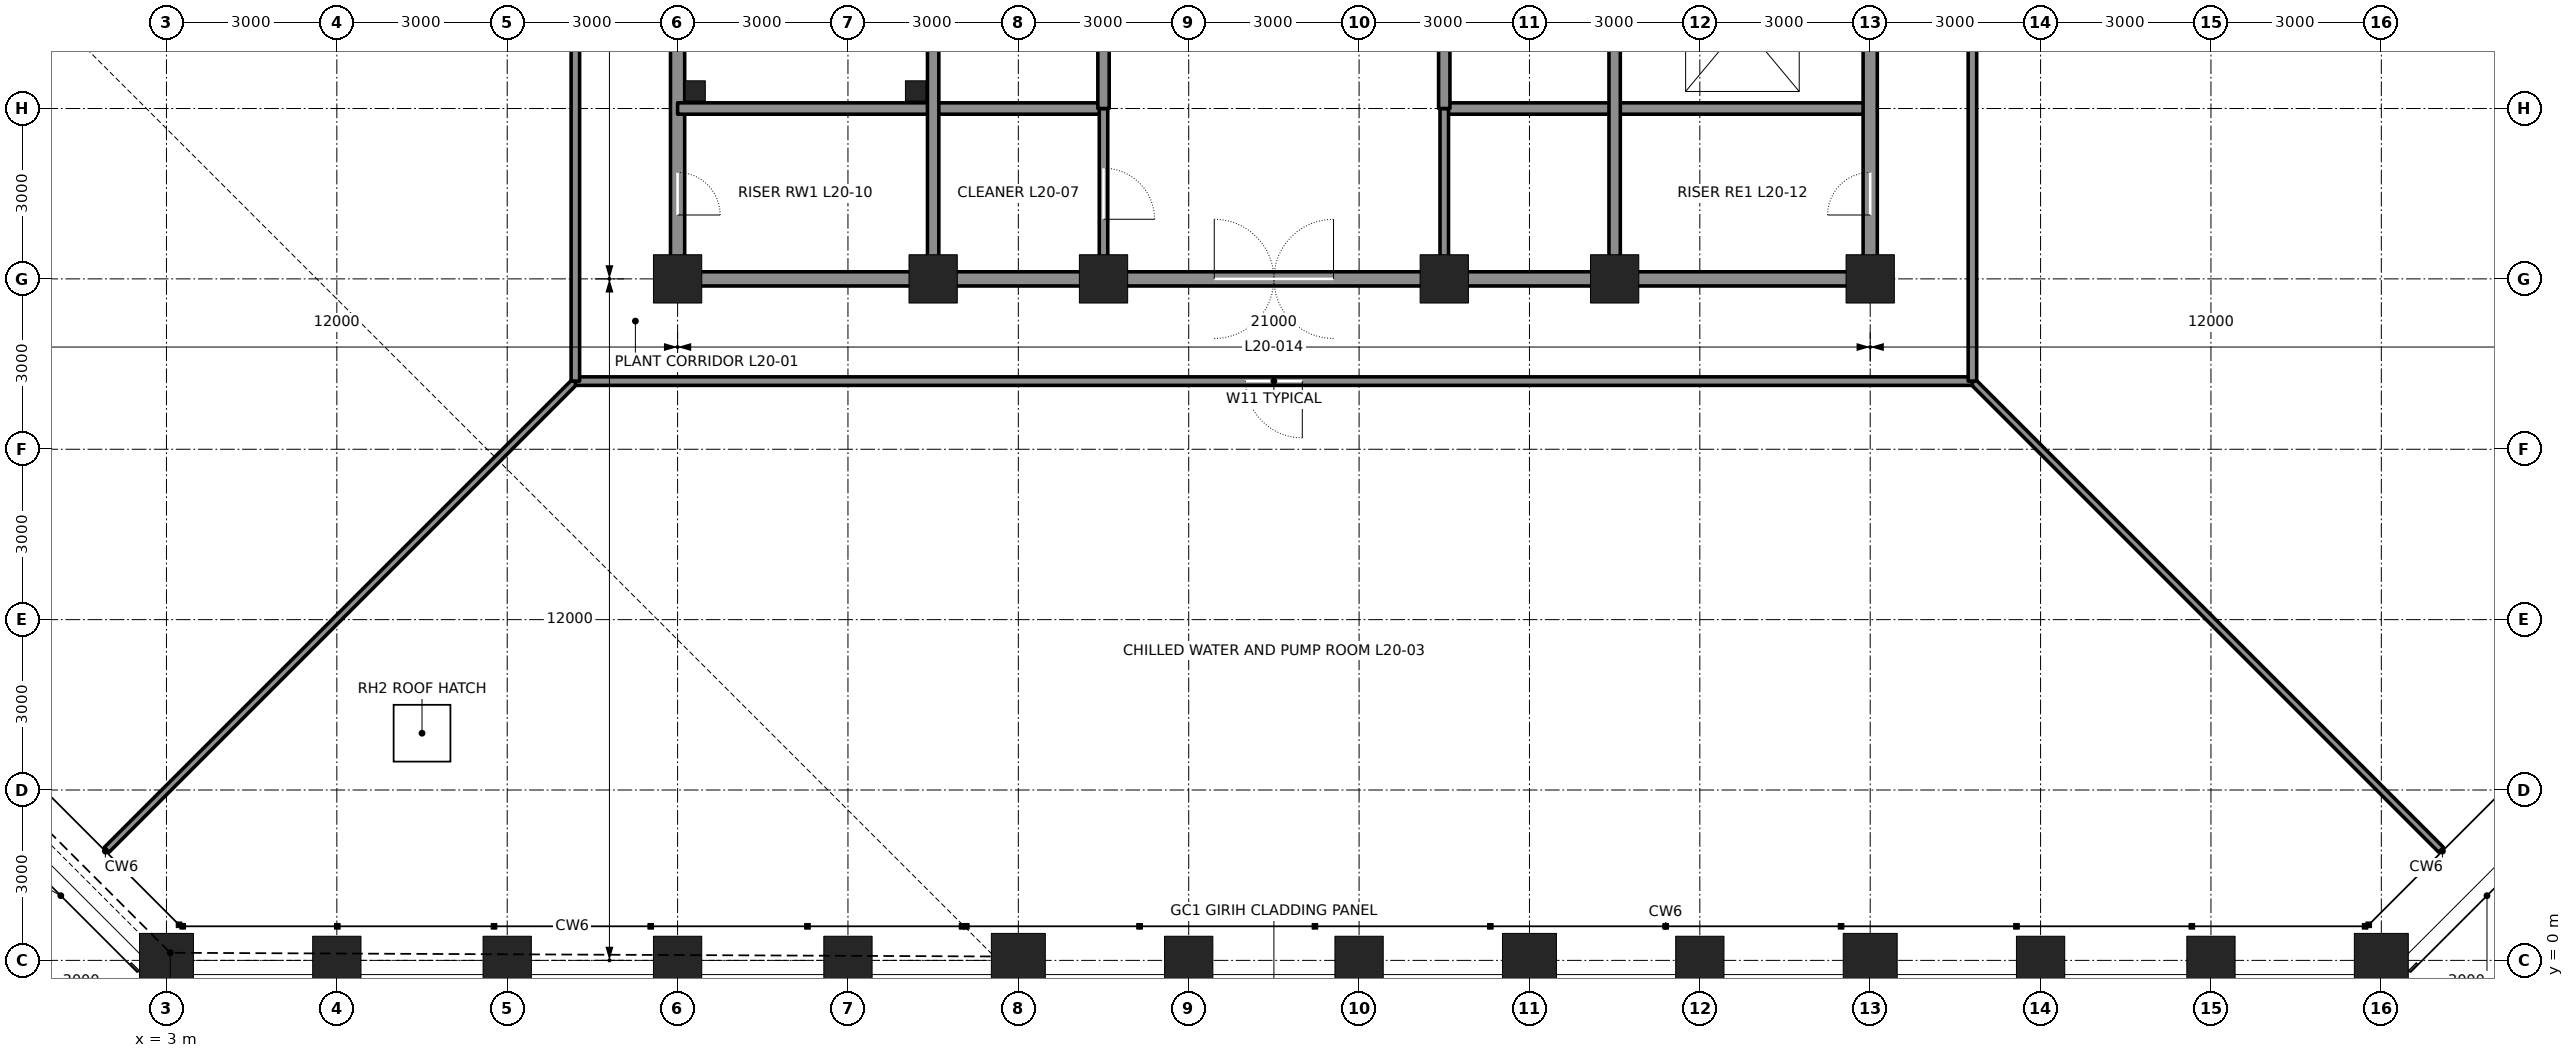
"""IFC4 building model, lengths in metres.
Left out: names, types, materials, properties, quantities, classifications, styles, units other than length and angle.
Written with IfcOpenShell. Run it as: python <this file> out.ifc"""

import sys

from ifc_helpers import new_model, si_unit, direction, frame, frame_2d, origin, origin_2d, place, context, subcontext, project, spatial, rectangle, hollow_rectangle, extrude, element, fill, save


model = new_model("IFC4")
c1 = context("Model", 3, precision=1e-05, world=origin(), true_north=direction((0.0, 1.0)))
c2 = subcontext(c1, "Body", "Model", "MODEL_VIEW")
j1 = project(units=[si_unit("LENGTHUNIT", "METRE"), si_unit("PLANEANGLEUNIT", "RADIAN")], contexts=[c1])
p1 = place(None, origin())
s1 = spatial("IfcSite", under=j1, at=p1, CompositionType="ELEMENT")
p2 = place(p1, origin())
s2 = spatial("IfcBuilding", under=s1, at=p2, CompositionType="ELEMENT")
p3 = place(p2, frame((0.0, 0.0, 96.3)))
s3 = spatial("IfcBuildingStorey", under=s2, at=p3, CompositionType="ELEMENT", Elevation=96.3)
p4 = place(p3, frame((3.0, 0.0, 0.0), z_axis=(0.0, 0.0, 1.0), x_axis=(0.0, -1.0, 0.0)))
e1 = element("IfcColumn", 1, at=p4, inside=s3, PredefinedType="COLUMN", context=c2, shape_type="SweptSolid", body=[
    extrude(hollow_rectangle(XDim=0.95, YDim=0.95, WallThickness=0.095, at=origin_2d()), origin(), (0.0, 0.0, 1.0), 2.345),
])
p5 = place(p3, frame((6.0, 0.0, 0.0), z_axis=(0.0, 0.0, 1.0), x_axis=(0.0, -1.0, 0.0)))
e2 = element("IfcColumn", 2, at=p5, inside=s3, PredefinedType="COLUMN", context=c2, shape_type="SweptSolid", body=[
    extrude(hollow_rectangle(XDim=0.85, YDim=0.85, WallThickness=0.085, at=origin_2d()), origin(), (0.0, 0.0, 1.0), 2.796),
])
p6 = place(p3, frame((9.0, 0.0, 0.0), z_axis=(0.0, 0.0, 1.0), x_axis=(0.0, -1.0, 0.0)))
e3 = element("IfcColumn", 3, at=p6, inside=s3, PredefinedType="COLUMN", context=c2, shape_type="SweptSolid", body=[
    extrude(hollow_rectangle(XDim=0.85, YDim=0.85, WallThickness=0.085, at=origin_2d()), origin(), (0.0, 0.0, 1.0), 3.247),
])
p7 = place(p3, frame((12.0, 0.0, 0.0), z_axis=(0.0, 0.0, 1.0), x_axis=(0.0, -1.0, 0.0)))
e4 = element("IfcColumn", 4, at=p7, inside=s3, PredefinedType="COLUMN", context=c2, shape_type="SweptSolid", body=[
    extrude(hollow_rectangle(XDim=0.85, YDim=0.85, WallThickness=0.085, at=origin_2d()), origin(), (0.0, 0.0, 1.0), 3.698),
])
p8 = place(p3, frame((15.0, 0.0, 0.0), z_axis=(0.0, 0.0, 1.0), x_axis=(0.0, -1.0, 0.0)))
e5 = element("IfcColumn", 5, at=p8, inside=s3, PredefinedType="COLUMN", context=c2, shape_type="SweptSolid", body=[
    extrude(hollow_rectangle(XDim=0.85, YDim=0.85, WallThickness=0.085, at=origin_2d()), origin(), (0.0, 0.0, 1.0), 4.149),
])
p9 = place(p3, frame((18.0, 0.0, 0.0), z_axis=(0.0, 0.0, 1.0), x_axis=(0.0, -1.0, 0.0)))
e6 = element("IfcColumn", 6, at=p9, inside=s3, PredefinedType="COLUMN", context=c2, shape_type="SweptSolid", body=[
    extrude(hollow_rectangle(XDim=0.95, YDim=0.95, WallThickness=0.11, at=origin_2d()), origin(), (0.0, 0.0, 1.0), 6.0),
])
for number, where, z_axis, x_axis in (
    (7, (21.0, 0.0, 0.0), (0.0, 0.0, 1.0), (0.0, -1.0, 0.0)),
    (8, (24.0, 0.0, 0.0), (0.0, 0.0, 1.0), (0.0, -1.0, 0.0)),
):
    element("IfcColumn", number, at=place(p3, frame(where, z_axis=z_axis, x_axis=x_axis)), inside=s3, PredefinedType="COLUMN", context=c2, shape_type="SweptSolid", body=[
        extrude(hollow_rectangle(XDim=0.85, YDim=0.85, WallThickness=0.085, at=origin_2d()), origin(), (0.0, 0.0, 1.0), 6.0),
    ])
p10 = place(p3, frame((27.0, 0.0, 0.0), z_axis=(0.0, 0.0, 1.0), x_axis=(0.0, -1.0, 0.0)))
e9 = element("IfcColumn", 9, at=p10, inside=s3, PredefinedType="COLUMN", context=c2, shape_type="SweptSolid", body=[
    extrude(hollow_rectangle(XDim=0.95, YDim=0.95, WallThickness=0.11, at=origin_2d()), origin(), (0.0, 0.0, 1.0), 6.0),
])
p11 = place(p3, frame((30.0, 0.0, 0.0), z_axis=(0.0, 0.0, 1.0), x_axis=(0.0, -1.0, 0.0)))
e10 = element("IfcColumn", 10, at=p11, inside=s3, PredefinedType="COLUMN", context=c2, shape_type="SweptSolid", body=[
    extrude(hollow_rectangle(XDim=0.85, YDim=0.85, WallThickness=0.085, at=origin_2d()), origin(), (0.0, 0.0, 1.0), 6.0),
])
p12 = place(p3, frame((33.0, 0.0, 0.0), z_axis=(0.0, 0.0, 1.0), x_axis=(0.0, -1.0, 0.0)))
e11 = element("IfcColumn", 11, at=p12, inside=s3, PredefinedType="COLUMN", context=c2, shape_type="SweptSolid", body=[
    extrude(hollow_rectangle(XDim=0.95, YDim=0.95, WallThickness=0.11, at=origin_2d()), origin(), (0.0, 0.0, 1.0), 6.0),
])
for number, where, z_axis, x_axis in (
    (12, (36.0, 0.0, 0.0), (0.0, 0.0, 1.0), (0.0, -1.0, 0.0)),
    (13, (39.0, 0.0, 0.0), (0.0, 0.0, 1.0), (0.0, -1.0, 0.0)),
):
    element("IfcColumn", number, at=place(p3, frame(where, z_axis=z_axis, x_axis=x_axis)), inside=s3, PredefinedType="COLUMN", context=c2, shape_type="SweptSolid", body=[
        extrude(hollow_rectangle(XDim=0.85, YDim=0.85, WallThickness=0.085, at=origin_2d()), origin(), (0.0, 0.0, 1.0), 6.0),
    ])
p13 = place(p3, frame((42.0, 0.0, 0.0), z_axis=(0.0, 0.0, 1.0), x_axis=(0.0, -1.0, 0.0)))
e14 = element("IfcColumn", 14, at=p13, inside=s3, PredefinedType="COLUMN", context=c2, shape_type="SweptSolid", body=[
    extrude(hollow_rectangle(XDim=0.95, YDim=0.95, WallThickness=0.095, at=origin_2d()), origin(), (0.0, 0.0, 1.0), 6.0),
])
for number, where, z_axis, x_axis in (
    (15, (12.0, 12.0, 0.0), (0.0, 0.0, 1.0), (1.0, 0.0, 0.0)),
    (16, (16.5, 12.0, 0.0), (0.0, 0.0, 1.0), (1.0, 0.0, 0.0)),
    (17, (19.5, 12.0, 0.0), (0.0, 0.0, 1.0), (1.0, 0.0, 0.0)),
    (18, (25.5, 12.0, 0.0), (0.0, 0.0, 1.0), (1.0, 0.0, 0.0)),
    (19, (28.5, 12.0, 0.0), (0.0, 0.0, 1.0), (1.0, 0.0, 0.0)),
    (20, (33.0, 12.0, 0.0), (0.0, 0.0, 1.0), (1.0, 0.0, 0.0)),
):
    element("IfcColumn", number, at=place(p3, frame(where, z_axis=z_axis, x_axis=x_axis)), inside=s3, PredefinedType="COLUMN", context=c2, shape_type="SweptSolid", body=[
        extrude(hollow_rectangle(XDim=0.85, YDim=0.85, WallThickness=0.085, at=origin_2d()), origin(), (0.0, 0.0, 1.0), 6.0),
    ])
p14 = place(p3, frame((12.0, 12.25, 0.0), z_axis=(0.0, 0.0, 1.0), x_axis=(0.0, 1.0, 0.0)))
e21 = element("IfcWall", 21, at=p14, inside=s3, PredefinedType="SOLIDWALL", context=c2, shape_type="SweptSolid", body=[
    extrude(rectangle(XDim=8.5, YDim=0.25, at=frame_2d((4.25, 0.0))), origin(), (0.0, 0.0, 1.0), 4.913),
])
p15 = place(p14, frame((0.875, 0.0, 0.0)))
e22 = element("IfcOpeningElement", 22, at=p15, cuts=e21, PredefinedType="OPENING", context=c2, shape_type="SweptSolid", body=[
    extrude(rectangle(XDim=0.75, YDim=2.1, at=frame_2d((0.375, 1.05))), frame((0.0, 0.135, 0.0), z_axis=(0.0, -1.0, 0.0), x_axis=(1.0, 0.0, 0.0)), (0.0, 0.0, 1.0), 0.27),
])
p16 = place(p3, frame((12.25, 12.0, 0.0), z_axis=(0.0, 0.0, 1.0), x_axis=(1.0, 0.0, 0.0)))
e23 = element("IfcWall", 23, at=p16, inside=s3, PredefinedType="SOLIDWALL", context=c2, shape_type="SweptSolid", body=[
    extrude(rectangle(XDim=4.0, YDim=0.25, at=frame_2d((2.0, 0.0))), origin(), (0.0, 0.0, 1.0), 4.981),
])
for number, where, z_axis, x_axis in (
    (24, (16.75, 12.0, 0.0), (0.0, 0.0, 1.0), (1.0, 0.0, 0.0)),
    (25, (25.75, 12.0, 0.0), (0.0, 0.0, 1.0), (1.0, 0.0, 0.0)),
):
    element("IfcWall", number, at=place(p3, frame(where, z_axis=z_axis, x_axis=x_axis)), inside=s3, PredefinedType="SOLIDWALL", context=c2, shape_type="SweptSolid", body=[
        extrude(rectangle(XDim=2.5, YDim=0.25, at=frame_2d((1.25, 0.0))), origin(), (0.0, 0.0, 1.0), 4.981),
    ])
p17 = place(p3, frame((28.75, 12.0, 0.0), z_axis=(0.0, 0.0, 1.0), x_axis=(1.0, 0.0, 0.0)))
e26 = element("IfcWall", 26, at=p17, inside=s3, PredefinedType="SOLIDWALL", context=c2, shape_type="SweptSolid", body=[
    extrude(rectangle(XDim=4.0, YDim=0.25, at=frame_2d((2.0, 0.0))), origin(), (0.0, 0.0, 1.0), 4.981),
])
for number, where, z_axis, x_axis in (
    (27, (12.0, 15.0, 0.0), (0.0, 0.0, 1.0), (1.0, 0.0, 0.0)),
    (28, (25.5, 15.0, 0.0), (0.0, 0.0, 1.0), (1.0, 0.0, 0.0)),
):
    element("IfcWall", number, at=place(p3, frame(where, z_axis=z_axis, x_axis=x_axis)), inside=s3, PredefinedType="SOLIDWALL", context=c2, shape_type="SweptSolid", body=[
        extrude(rectangle(XDim=7.5, YDim=0.2, at=frame_2d((3.75, 0.0))), origin(), (0.0, 0.0, 1.0), 5.84),
    ])
p18 = place(p3, frame((16.5, 12.25, 0.0), z_axis=(0.0, 0.0, 1.0), x_axis=(0.0, 1.0, 0.0)))
e29 = element("IfcWall", 29, at=p18, inside=s3, PredefinedType="SOLIDWALL", context=c2, shape_type="SweptSolid", body=[
    extrude(rectangle(XDim=8.5, YDim=0.2, at=frame_2d((4.25, 0.0))), origin(), (0.0, 0.0, 1.0), 4.913),
])
p19 = place(p3, frame((19.5, 12.25, 0.0), z_axis=(0.0, 0.0, 1.0), x_axis=(0.0, 1.0, 0.0)))
e30 = element("IfcWall", 30, at=p19, inside=s3, PredefinedType="PARTITIONING", context=c2, shape_type="SweptSolid", body=[
    extrude(rectangle(XDim=2.75, YDim=0.15, at=frame_2d((1.375, 0.0))), origin(), (0.0, 0.0, 1.0), 4.865),
])
p20 = place(p19, frame((0.8, 0.0, 0.0)))
e31 = element("IfcOpeningElement", 31, at=p20, cuts=e30, PredefinedType="OPENING", context=c2, shape_type="SweptSolid", body=[
    extrude(rectangle(XDim=0.9, YDim=2.1, at=frame_2d((0.45, 1.05))), frame((0.0, 0.085, 0.0), z_axis=(0.0, -1.0, 0.0), x_axis=(1.0, 0.0, 0.0)), (0.0, 0.0, 1.0), 0.17),
])
p21 = place(p3, frame((19.5, 15.0, 0.0), z_axis=(0.0, 0.0, 1.0), x_axis=(0.0, 1.0, 0.0)))
e32 = element("IfcWall", 32, at=p21, inside=s3, PredefinedType="SOLIDWALL", context=c2, shape_type="SweptSolid", body=[
    extrude(rectangle(XDim=12.0, YDim=0.2, at=frame_2d((6.0, 0.0))), origin(), (0.0, 0.0, 1.0), 4.865),
])
p22 = place(p3, frame((25.5, 12.25, 0.0), z_axis=(0.0, 0.0, 1.0), x_axis=(0.0, 1.0, 0.0)))
e33 = element("IfcWall", 33, at=p22, inside=s3, PredefinedType="PARTITIONING", context=c2, shape_type="SweptSolid", body=[
    extrude(rectangle(XDim=2.75, YDim=0.15, at=frame_2d((1.375, 0.0))), origin(), (0.0, 0.0, 1.0), 4.865),
])
p23 = place(p3, frame((25.5, 15.0, 0.0), z_axis=(0.0, 0.0, 1.0), x_axis=(0.0, 1.0, 0.0)))
e34 = element("IfcWall", 34, at=p23, inside=s3, PredefinedType="SOLIDWALL", context=c2, shape_type="SweptSolid", body=[
    extrude(rectangle(XDim=12.0, YDim=0.2, at=frame_2d((6.0, 0.0))), origin(), (0.0, 0.0, 1.0), 4.865),
])
p24 = place(p3, frame((28.5, 12.25, 0.0), z_axis=(0.0, 0.0, 1.0), x_axis=(0.0, 1.0, 0.0)))
e35 = element("IfcWall", 35, at=p24, inside=s3, PredefinedType="SOLIDWALL", context=c2, shape_type="SweptSolid", body=[
    extrude(rectangle(XDim=8.5, YDim=0.2, at=frame_2d((4.25, 0.0))), origin(), (0.0, 0.0, 1.0), 4.913),
])
p25 = place(p3, frame((33.0, 12.25, 0.0), z_axis=(0.0, 0.0, 1.0), x_axis=(0.0, 1.0, 0.0)))
e36 = element("IfcWall", 36, at=p25, inside=s3, PredefinedType="SOLIDWALL", context=c2, shape_type="SweptSolid", body=[
    extrude(rectangle(XDim=8.5, YDim=0.25, at=frame_2d((4.25, 0.0))), origin(), (0.0, 0.0, 1.0), 4.913),
])
p26 = place(p25, frame((6.65, 0.0, 0.0)))
e37 = element("IfcOpeningElement", 37, at=p26, cuts=e36, PredefinedType="OPENING", context=c2, shape_type="SweptSolid", body=[
    extrude(rectangle(XDim=1.2, YDim=2.1, at=frame_2d((0.6, 1.05))), frame((0.0, 0.135, 0.0), z_axis=(0.0, -1.0, 0.0), x_axis=(1.0, 0.0, 0.0)), (0.0, 0.0, 1.0), 0.27),
])
p27 = place(p25, frame((0.875, 0.0, 0.0)))
e38 = element("IfcOpeningElement", 38, at=p27, cuts=e36, PredefinedType="OPENING", context=c2, shape_type="SweptSolid", body=[
    extrude(rectangle(XDim=0.75, YDim=2.1, at=frame_2d((0.375, 1.05))), frame((0.0, 0.135, 0.0), z_axis=(0.0, -1.0, 0.0), x_axis=(1.0, 0.0, 0.0)), (0.0, 0.0, 1.0), 0.27),
])
p28 = place(p3, frame((19.5, 12.0, 0.0), z_axis=(0.0, 0.0, 1.0), x_axis=(1.0, 0.0, 0.0)))
e39 = element("IfcWall", 39, at=p28, inside=s3, PredefinedType="SOLIDWALL", context=c2, shape_type="SweptSolid", body=[
    extrude(rectangle(XDim=6.0, YDim=0.25, at=frame_2d((3.0, 0.0))), origin(), (0.0, 0.0, 1.0), 4.981),
])
p29 = place(p28, frame((1.95, 0.0, 0.0)))
e40 = element("IfcOpeningElement", 40, at=p29, cuts=e39, PredefinedType="OPENING", context=c2, shape_type="SweptSolid", body=[
    extrude(rectangle(XDim=2.1, YDim=2.4, at=frame_2d((1.05, 1.2))), frame((0.0, 0.135, 0.0), z_axis=(0.0, -1.0, 0.0), x_axis=(1.0, 0.0, 0.0)), (0.0, 0.0, 1.0), 0.27),
])
for number, where, z_axis, x_axis in (
    (41, (10.2, 10.2, 0.0), (0.0, 0.0, 1.0), (-0.707, -0.707, 0.0)),
    (42, (34.8, 10.2, 0.0), (0.0, 0.0, 1.0), (0.707, -0.707, 0.0)),
):
    element("IfcWall", number, at=place(p3, frame(where, z_axis=z_axis, x_axis=x_axis)), inside=s3, PredefinedType="PARTITIONING", context=c2, shape_type="SweptSolid", body=[
        extrude(rectangle(XDim=11.671, YDim=0.12, at=frame_2d((5.836, 0.0))), origin(), (0.0, 0.0, 1.0), 5.84),
    ])
p30 = place(p3, frame((10.2, 10.2, 0.0), z_axis=(0.0, 0.0, 1.0), x_axis=(1.0, 0.0, 0.0)))
e43 = element("IfcWall", 43, at=p30, inside=s3, PredefinedType="PARTITIONING", context=c2, shape_type="SweptSolid", body=[
    extrude(rectangle(XDim=24.6, YDim=0.15, at=frame_2d((12.3, 0.0))), origin(), (0.0, 0.0, 1.0), 5.84),
])
p31 = place(p30, frame((11.8, 0.0, 0.0)))
e44 = element("IfcOpeningElement", 44, at=p31, cuts=e43, PredefinedType="OPENING", context=c2, shape_type="SweptSolid", body=[
    extrude(rectangle(XDim=1.0, YDim=2.4, at=frame_2d((0.5, 1.2))), frame((0.0, 0.085, 0.0), z_axis=(0.0, -1.0, 0.0), x_axis=(1.0, 0.0, 0.0)), (0.0, 0.0, 1.0), 0.17),
])
p32 = place(p3, frame((10.2, 10.2, 0.0), z_axis=(0.0, 0.0, 1.0), x_axis=(0.0, 1.0, 0.0)))
e45 = element("IfcWall", 45, at=p32, inside=s3, PredefinedType="PARTITIONING", context=c2, shape_type="SweptSolid", body=[
    extrude(rectangle(XDim=24.6, YDim=0.15, at=frame_2d((12.3, 0.0))), origin(), (0.0, 0.0, 1.0), 5.84),
])
p33 = place(p32, frame((11.8, 0.0, 0.0)))
e46 = element("IfcOpeningElement", 46, at=p33, cuts=e45, PredefinedType="OPENING", context=c2, shape_type="SweptSolid", body=[
    extrude(rectangle(XDim=1.0, YDim=2.4, at=frame_2d((0.5, 1.2))), frame((0.0, 0.085, 0.0), z_axis=(0.0, -1.0, 0.0), x_axis=(1.0, 0.0, 0.0)), (0.0, 0.0, 1.0), 0.17),
])
p34 = place(p3, frame((34.8, 10.2, 0.0), z_axis=(0.0, 0.0, 1.0), x_axis=(0.0, 1.0, 0.0)))
e47 = element("IfcWall", 47, at=p34, inside=s3, PredefinedType="PARTITIONING", context=c2, shape_type="SweptSolid", body=[
    extrude(rectangle(XDim=24.6, YDim=0.15, at=frame_2d((12.3, 0.0))), origin(), (0.0, 0.0, 1.0), 5.84),
])
p35 = place(p34, frame((11.8, 0.0, 0.0)))
e48 = element("IfcOpeningElement", 48, at=p35, cuts=e47, PredefinedType="OPENING", context=c2, shape_type="SweptSolid", body=[
    extrude(rectangle(XDim=1.0, YDim=2.4, at=frame_2d((0.5, 1.2))), frame((0.0, 0.085, 0.0), z_axis=(0.0, -1.0, 0.0), x_axis=(1.0, 0.0, 0.0)), (0.0, 0.0, 1.0), 0.17),
])
for number, where, z_axis, x_axis in (
    (49, (12.31, 15.31, 0.0), (0.0, 0.0, 1.0), (1.0, 0.0, 0.0)),
    (50, (16.19, 15.31, 0.0), (0.0, 0.0, 1.0), (1.0, 0.0, 0.0)),
):
    element("IfcColumn", number, at=place(p3, frame(where, z_axis=z_axis, x_axis=x_axis)), inside=s3, PredefinedType="COLUMN", context=c2, shape_type="SweptSolid", body=[
        extrude(hollow_rectangle(XDim=0.356, YDim=0.356, WallThickness=0.015, at=origin_2d()), origin(), (0.0, 0.0, 1.0), 6.0),
    ])
p36 = place(p3, frame((7.5, 4.0, 4.519)))
p37 = place(p36, frame((0.0, 0.0, 0.454)))
e51 = element("IfcDoor", 51, at=p37, inside=s3, OperationType="SINGLE_SWING_LEFT", PredefinedType="TRAPDOOR", context=c2, shape_type="SweptSolid", body=[
    extrude(rectangle(XDim=1.0, YDim=1.0, at=origin_2d()), origin(), (0.0, 0.0, 1.0), 0.05),
])
p38 = place(p29, origin())
e52 = element("IfcDoor", 52, at=p38, inside=s3, OperationType="DOUBLE_DOOR_DOUBLE_SWING", PredefinedType="DOOR", context=c2, shape_type="SweptSolid", body=[
    extrude(rectangle(XDim=2.1, YDim=2.4, at=frame_2d((1.05, 1.2))), frame((0.0, 0.025, 0.0), z_axis=(0.0, -1.0, 0.0), x_axis=(1.0, 0.0, 0.0)), (0.0, 0.0, 1.0), 0.05),
])
fill(e40, e52)
p39 = place(p15, frame((0.75, 0.0, 0.0), z_axis=(0.0, 0.0, 1.0), x_axis=(-1.0, 0.0, 0.0)))
e53 = element("IfcDoor", 53, at=p39, inside=s3, OperationType="SINGLE_SWING_RIGHT", PredefinedType="DOOR", context=c2, shape_type="SweptSolid", body=[
    extrude(rectangle(XDim=0.75, YDim=2.1, at=frame_2d((0.375, 1.05))), frame((0.0, 0.025, 0.0), z_axis=(0.0, -1.0, 0.0), x_axis=(1.0, 0.0, 0.0)), (0.0, 0.0, 1.0), 0.05),
])
fill(e22, e53)
p40 = place(p27, origin())
e54 = element("IfcDoor", 54, at=p40, inside=s3, OperationType="SINGLE_SWING_LEFT", PredefinedType="DOOR", context=c2, shape_type="SweptSolid", body=[
    extrude(rectangle(XDim=0.75, YDim=2.1, at=frame_2d((0.375, 1.05))), frame((0.0, 0.025, 0.0), z_axis=(0.0, -1.0, 0.0), x_axis=(1.0, 0.0, 0.0)), (0.0, 0.0, 1.0), 0.05),
])
fill(e38, e54)
p41 = place(p20, frame((0.9, 0.0, 0.0), z_axis=(0.0, 0.0, 1.0), x_axis=(-1.0, 0.0, 0.0)))
e55 = element("IfcDoor", 55, at=p41, inside=s3, OperationType="SINGLE_SWING_RIGHT", PredefinedType="DOOR", context=c2, shape_type="SweptSolid", body=[
    extrude(rectangle(XDim=0.9, YDim=2.1, at=frame_2d((0.45, 1.05))), frame((0.0, 0.025, 0.0), z_axis=(0.0, -1.0, 0.0), x_axis=(1.0, 0.0, 0.0)), (0.0, 0.0, 1.0), 0.05),
])
fill(e31, e55)
p42 = place(p31, frame((1.0, 0.0, 0.0), z_axis=(0.0, 0.0, 1.0), x_axis=(-1.0, 0.0, 0.0)))
e56 = element("IfcDoor", 56, at=p42, inside=s3, OperationType="SINGLE_SWING_LEFT", PredefinedType="DOOR", context=c2, shape_type="SweptSolid", body=[
    extrude(rectangle(XDim=1.0, YDim=2.4, at=frame_2d((0.5, 1.2))), frame((0.0, 0.025, 0.0), z_axis=(0.0, -1.0, 0.0), x_axis=(1.0, 0.0, 0.0)), (0.0, 0.0, 1.0), 0.05),
])
fill(e44, e56)
save(model, sys.argv[1])
